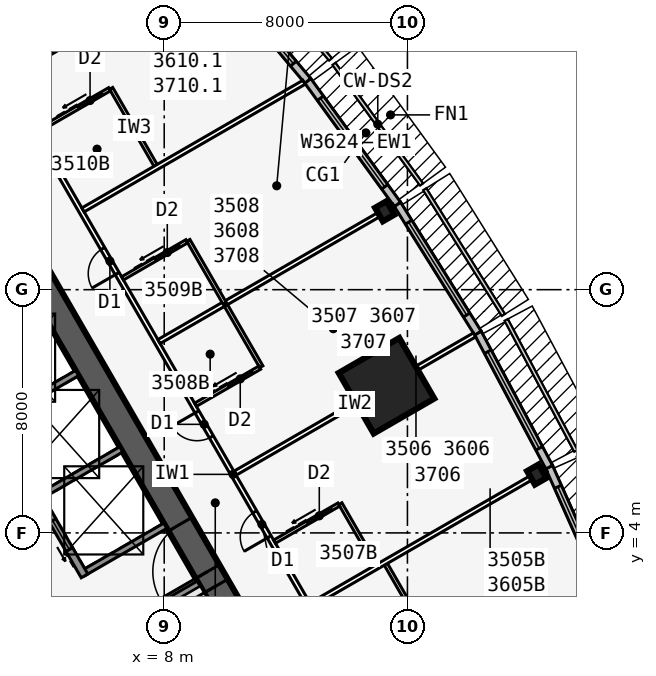
"""IFC4 building model, lengths in metres.
Left out: names, types, materials, properties, quantities, classifications, styles, units other than length and angle.
Written with IfcOpenShell. Run it as: python <this file> out.ifc"""

import sys

from ifc_helpers import new_model, si_unit, direction, frame, frame_2d, origin, origin_2d, place, context, subcontext, project, spatial, rectangle, i_section, extrude, element, fill, save


model = new_model("IFC4")
c1 = context("Model", 3, precision=1e-05, world=origin(), true_north=direction((0.0, 1.0)))
c2 = subcontext(c1, "Body", "Model", "MODEL_VIEW")
j1 = project(units=[si_unit("LENGTHUNIT", "METRE"), si_unit("PLANEANGLEUNIT", "RADIAN")], contexts=[c1])
p1 = place(None, origin())
s1 = spatial("IfcSite", under=j1, at=p1, CompositionType="ELEMENT")
p2 = place(p1, origin())
s2 = spatial("IfcBuilding", under=s1, at=p2, CompositionType="ELEMENT")
p3 = place(p2, frame((0.0, 0.0, 135.1)))
s3 = spatial("IfcBuildingStorey", under=s2, at=p3, CompositionType="ELEMENT", Elevation=135.1)
p4 = place(p3, frame((16.5, -9.526, 0.0), z_axis=(0.0, 0.0, 1.0), x_axis=(-0.499999749417, 0.866025548458, 0.0)))
e1 = element("IfcWall", 1, at=p4, inside=s3, PredefinedType="SHEAR", context=c2, shape_type="SweptSolid", body=[
    extrude(rectangle(XDim=33.0, YDim=0.9, at=frame_2d((16.5, 0.0))), origin(), (0.0, 0.0, 1.0), 3.4),
])
p5 = place(p4, frame((14.15, 0.0, 0.0)))
e2 = element("IfcOpeningElement", 2, at=p5, cuts=e1, PredefinedType="OPENING", context=c2, shape_type="SweptSolid", body=[
    extrude(rectangle(XDim=1.8, YDim=2.13, at=frame_2d((0.9, 1.065))), frame((0.0, 0.46, 0.0), z_axis=(0.0, -1.0, 0.0), x_axis=(1.0, 0.0, 0.0)), (0.0, 0.0, 1.0), 0.92),
])
p6 = place(p4, frame((12.6, 0.0, 0.0)))
e3 = element("IfcOpeningElement", 3, at=p6, cuts=e1, PredefinedType="OPENING", context=c2, shape_type="SweptSolid", body=[
    extrude(rectangle(XDim=1.0, YDim=2.13, at=frame_2d((0.5, 1.065))), frame((0.0, 0.46, 0.0), z_axis=(0.0, -1.0, 0.0), x_axis=(1.0, 0.0, 0.0)), (0.0, 0.0, 1.0), 0.92),
])
p7 = place(p3, frame((5.379, 2.586, 0.0), z_axis=(0.0, 0.0, 1.0), x_axis=(-0.500001375892, 0.866024609411, 0.0)))
e4 = element("IfcWall", 4, at=p7, inside=s3, PredefinedType="SOLIDWALL", context=c2, shape_type="SweptSolid", body=[
    extrude(rectangle(XDim=10.633, YDim=0.25, at=frame_2d((5.316, 0.0))), origin(), (0.0, 0.0, 1.0), 3.235),
])
p8 = place(p7, frame((9.164, 0.0, 0.0)))
e5 = element("IfcOpeningElement", 5, at=p8, cuts=e4, PredefinedType="OPENING", context=c2, shape_type="SweptSolid", body=[
    extrude(rectangle(XDim=0.9, YDim=2.13, at=frame_2d((0.45, 1.065))), frame((0.0, 0.135, 0.0), z_axis=(0.0, -1.0, 0.0), x_axis=(1.0, 0.0, 0.0)), (0.0, 0.0, 1.0), 0.27),
])
p9 = place(p7, frame((1.0, 0.0, 0.0)))
e6 = element("IfcOpeningElement", 6, at=p9, cuts=e4, PredefinedType="OPENING", context=c2, shape_type="SweptSolid", body=[
    extrude(rectangle(XDim=1.1, YDim=2.13, at=frame_2d((0.55, 1.065))), frame((0.0, 0.135, 0.0), z_axis=(0.0, -1.0, 0.0), x_axis=(1.0, 0.0, 0.0)), (0.0, 0.0, 1.0), 0.27),
])
p10 = place(p7, frame((3.9, 0.0, 0.0)))
e7 = element("IfcOpeningElement", 7, at=p10, cuts=e4, PredefinedType="OPENING", context=c2, shape_type="SweptSolid", body=[
    extrude(rectangle(XDim=1.1, YDim=2.13, at=frame_2d((0.55, 1.065))), frame((0.0, 0.135, 0.0), z_axis=(0.0, -1.0, 0.0), x_axis=(1.0, 0.0, 0.0)), (0.0, 0.0, 1.0), 0.27),
])
p11 = place(p7, frame((6.8, 0.0, 0.0)))
e8 = element("IfcOpeningElement", 8, at=p11, cuts=e4, PredefinedType="OPENING", context=c2, shape_type="SweptSolid", body=[
    extrude(rectangle(XDim=1.1, YDim=2.13, at=frame_2d((0.55, 1.065))), frame((0.0, 0.135, 0.0), z_axis=(0.0, -1.0, 0.0), x_axis=(1.0, 0.0, 0.0)), (0.0, 0.0, 1.0), 0.27),
])
for number, where, z_axis, x_axis in (
    (9, (6.429, 0.767, 0.0), (0.0, 0.0, 1.0), (0.866, 0.5, 0.0)),
    (10, (5.329, 2.673, 0.0), (0.0, 0.0, 1.0), (0.866, 0.5, 0.0)),
    (11, (3.879, 5.184, 0.0), (0.0, 0.0, 1.0), (0.866, 0.5, 0.0)),
    (12, (2.429, 7.696, 0.0), (0.0, 0.0, 1.0), (0.866, 0.5, 0.0)),
):
    element("IfcWall", number, at=place(p3, frame(where, z_axis=z_axis, x_axis=x_axis)), inside=s3, PredefinedType="SOLIDWALL", context=c2, shape_type="SweptSolid", body=[
        extrude(rectangle(XDim=3.125, YDim=0.2, at=frame_2d((1.562, 0.0))), origin(), (0.0, 0.0, 1.0), 3.235),
    ])
for number, where, z_axis, x_axis in (
    (13, (20.254, 5.92, 0.0), (0.0, 0.0, 1.0), (0.866, 0.5, 0.0)),
    (14, (15.254, 14.58, 0.0), (0.0, 0.0, 1.0), (0.866, 0.5, 0.0)),
):
    element("IfcColumn", number, at=place(p3, frame(where, z_axis=z_axis, x_axis=x_axis)), inside=s3, PredefinedType="COLUMN", context=c2, shape_type="SweptSolid", body=[
        extrude(i_section(OverallWidth=0.437, OverallDepth=0.513, WebThickness=0.061, FlangeThickness=0.097, at=origin_2d()), origin(), (0.0, 0.0, 1.0), 3.4),
    ])
p12 = place(p3, frame((15.312, 8.84, 0.0), z_axis=(0.0, 0.0, 1.0), x_axis=(0.866025403784, 0.5, 0.0)))
e15 = element("IfcColumn", 15, at=p12, inside=s3, PredefinedType="COLUMN", context=c2, shape_type="SweptSolid", body=[
    extrude(rectangle(XDim=2.3, YDim=2.3, at=origin_2d()), origin(), (0.0, 0.0, 1.0), 3.4),
])
p13 = place(p3, frame((22.705, 1.576, 0.0), z_axis=(0.0, 0.0, 1.0), x_axis=(-0.406832200364, 0.913502906808, 0.0)))
e16 = element("IfcWall", 16, at=p13, inside=s3, PredefinedType="STANDARD", context=c2, shape_type="SweptSolid", body=[
    extrude(rectangle(XDim=5.028, YDim=0.25, at=frame_2d((2.514, 0.0))), origin(), (0.0, 0.0, 1.0), 3.235),
])
p14 = place(p13, frame((0.714, 0.0, 0.45)))
e17 = element("IfcOpeningElement", 17, at=p14, cuts=e16, PredefinedType="OPENING", context=c2, shape_type="SweptSolid", body=[
    extrude(rectangle(XDim=3.6, YDim=2.4, at=frame_2d((1.8, 1.2))), frame((0.0, 0.135, 0.0), z_axis=(0.0, -1.0, 0.0), x_axis=(1.0, 0.0, 0.0)), (0.0, 0.0, 1.0), 0.27),
])
p15 = place(p3, frame((20.663, 6.161, 0.0), z_axis=(0.0, 0.0, 1.0), x_axis=(-0.469404966864, 0.882982999317, 0.0)))
e18 = element("IfcWall", 18, at=p15, inside=s3, PredefinedType="STANDARD", context=c2, shape_type="SweptSolid", body=[
    extrude(rectangle(XDim=5.003, YDim=0.25, at=frame_2d((2.501, 0.0))), origin(), (0.0, 0.0, 1.0), 3.235),
])
p16 = place(p15, frame((0.701, 0.0, 0.45)))
e19 = element("IfcOpeningElement", 19, at=p16, cuts=e18, PredefinedType="OPENING", context=c2, shape_type="SweptSolid", body=[
    extrude(rectangle(XDim=3.6, YDim=2.4, at=frame_2d((1.8, 1.2))), frame((0.0, 0.135, 0.0), z_axis=(0.0, -1.0, 0.0), x_axis=(1.0, 0.0, 0.0)), (0.0, 0.0, 1.0), 0.27),
])
p17 = place(p3, frame((18.319, 10.571, 0.0), z_axis=(0.0, 0.0, 1.0), x_axis=(-0.529990167382, 0.84800378683, 0.0)))
e20 = element("IfcWall", 20, at=p17, inside=s3, PredefinedType="STANDARD", context=c2, shape_type="SweptSolid", body=[
    extrude(rectangle(XDim=5.003, YDim=0.25, at=frame_2d((2.501, 0.0))), origin(), (0.0, 0.0, 1.0), 3.235),
])
p18 = place(p17, frame((0.701, 0.0, 0.45)))
e21 = element("IfcOpeningElement", 21, at=p18, cuts=e20, PredefinedType="OPENING", context=c2, shape_type="SweptSolid", body=[
    extrude(rectangle(XDim=3.6, YDim=2.4, at=frame_2d((1.8, 1.2))), frame((0.0, 0.135, 0.0), z_axis=(0.0, -1.0, 0.0), x_axis=(1.0, 0.0, 0.0)), (0.0, 0.0, 1.0), 0.27),
])
p19 = place(p3, frame((15.672, 14.807, 0.0), z_axis=(0.0, 0.0, 1.0), x_axis=(-0.587669188412, 0.809101307001, 0.0)))
e22 = element("IfcWall", 22, at=p19, inside=s3, PredefinedType="STANDARD", context=c2, shape_type="SweptSolid", body=[
    extrude(rectangle(XDim=5.028, YDim=0.25, at=frame_2d((2.514, 0.0))), origin(), (0.0, 0.0, 1.0), 3.235),
])
p20 = place(p19, frame((0.714, 0.0, 0.45)))
e23 = element("IfcOpeningElement", 23, at=p20, cuts=e22, PredefinedType="OPENING", context=c2, shape_type="SweptSolid", body=[
    extrude(rectangle(XDim=3.6, YDim=2.4, at=frame_2d((1.8, 1.2))), frame((0.0, 0.135, 0.0), z_axis=(0.0, -1.0, 0.0), x_axis=(1.0, 0.0, 0.0)), (0.0, 0.0, 1.0), 0.27),
])
p21 = place(p3, frame((12.723, 18.868, 0.0), z_axis=(0.0, 0.0, 1.0), x_axis=(-0.641810386606, 0.766863369607, 0.0)))
e24 = element("IfcWall", 24, at=p21, inside=s3, PredefinedType="STANDARD", context=c2, shape_type="SweptSolid", body=[
    extrude(rectangle(XDim=5.076, YDim=0.25, at=frame_2d((2.538, 0.0))), origin(), (0.0, 0.0, 1.0), 3.235),
])
p22 = place(p21, frame((0.738, 0.0, 0.45)))
e25 = element("IfcOpeningElement", 25, at=p22, cuts=e24, PredefinedType="OPENING", context=c2, shape_type="SweptSolid", body=[
    extrude(rectangle(XDim=3.6, YDim=2.4, at=frame_2d((1.8, 1.2))), frame((0.0, 0.135, 0.0), z_axis=(0.0, -1.0, 0.0), x_axis=(1.0, 0.0, 0.0)), (0.0, 0.0, 1.0), 0.27),
])
p23 = place(p3, frame((20.027, -10.985, 0.0), z_axis=(0.0, 0.0, 1.0), x_axis=(-0.500001677587, 0.866024435227, 0.0)))
e26 = element("IfcWall", 26, at=p23, inside=s3, PredefinedType="PARTITIONING", context=c2, shape_type="SweptSolid", body=[
    extrude(rectangle(XDim=39.054, YDim=0.15, at=frame_2d((19.527, 0.0))), origin(), (0.0, 0.0, 1.0), 3.235),
])
p24 = place(p23, frame((1.558, 0.0, 0.0)))
e27 = element("IfcOpeningElement", 27, at=p24, cuts=e26, PredefinedType="OPENING", context=c2, shape_type="SweptSolid", body=[
    extrude(rectangle(XDim=0.95, YDim=2.13, at=frame_2d((0.475, 1.065))), frame((0.0, 0.085, 0.0), z_axis=(0.0, -1.0, 0.0), x_axis=(1.0, 0.0, 0.0)), (0.0, 0.0, 1.0), 0.17),
])
p25 = place(p23, frame((10.352, 0.0, 0.0)))
e28 = element("IfcOpeningElement", 28, at=p25, cuts=e26, PredefinedType="OPENING", context=c2, shape_type="SweptSolid", body=[
    extrude(rectangle(XDim=0.95, YDim=2.13, at=frame_2d((0.475, 1.065))), frame((0.0, 0.085, 0.0), z_axis=(0.0, -1.0, 0.0), x_axis=(1.0, 0.0, 0.0)), (0.0, 0.0, 1.0), 0.17),
])
p26 = place(p23, frame((17.152, 0.0, 0.0)))
e29 = element("IfcOpeningElement", 29, at=p26, cuts=e26, PredefinedType="OPENING", context=c2, shape_type="SweptSolid", body=[
    extrude(rectangle(XDim=0.95, YDim=2.13, at=frame_2d((0.475, 1.065))), frame((0.0, 0.085, 0.0), z_axis=(0.0, -1.0, 0.0), x_axis=(1.0, 0.0, 0.0)), (0.0, 0.0, 1.0), 0.17),
])
p27 = place(p23, frame((20.952, 0.0, 0.0)))
e30 = element("IfcOpeningElement", 30, at=p27, cuts=e26, PredefinedType="OPENING", context=c2, shape_type="SweptSolid", body=[
    extrude(rectangle(XDim=0.95, YDim=2.13, at=frame_2d((0.475, 1.065))), frame((0.0, 0.085, 0.0), z_axis=(0.0, -1.0, 0.0), x_axis=(1.0, 0.0, 0.0)), (0.0, 0.0, 1.0), 0.17),
])
p28 = place(p23, frame((27.152, 0.0, 0.0)))
e31 = element("IfcOpeningElement", 31, at=p28, cuts=e26, PredefinedType="OPENING", context=c2, shape_type="SweptSolid", body=[
    extrude(rectangle(XDim=0.95, YDim=2.13, at=frame_2d((0.475, 1.065))), frame((0.0, 0.085, 0.0), z_axis=(0.0, -1.0, 0.0), x_axis=(1.0, 0.0, 0.0)), (0.0, 0.0, 1.0), 0.17),
])
p29 = place(p23, frame((36.546, 0.0, 0.0)))
e32 = element("IfcOpeningElement", 32, at=p29, cuts=e26, PredefinedType="OPENING", context=c2, shape_type="SweptSolid", body=[
    extrude(rectangle(XDim=0.95, YDim=2.13, at=frame_2d((0.475, 1.065))), frame((0.0, 0.085, 0.0), z_axis=(0.0, -1.0, 0.0), x_axis=(1.0, 0.0, 0.0)), (0.0, 0.0, 1.0), 0.17),
])
p30 = place(p3, frame((12.829, 1.633, 0.0), z_axis=(0.0, 0.0, 1.0), x_axis=(0.866027015393, 0.499997208602, 0.0)))
e33 = element("IfcWall", 33, at=p30, inside=s3, PredefinedType="PARTITIONING", context=c2, shape_type="SweptSolid", body=[
    extrude(rectangle(XDim=8.922, YDim=0.15, at=frame_2d((4.461, 0.0))), origin(), (0.0, 0.0, 1.0), 2.389),
])
p31 = place(p3, frame((10.329, 5.963, 0.0), z_axis=(0.0, 0.0, 1.0), x_axis=(0.866025170687, 0.500000403736, 0.0)))
e34 = element("IfcWall", 34, at=p31, inside=s3, PredefinedType="PARTITIONING", context=c2, shape_type="SweptSolid", body=[
    extrude(rectangle(XDim=9.099, YDim=0.15, at=frame_2d((4.549, 0.0))), origin(), (0.0, 0.0, 1.0), 2.389),
])
p32 = place(p3, frame((7.829, 10.293, 0.0), z_axis=(0.0, 0.0, 1.0), x_axis=(0.866027015393, 0.499997208602, 0.0)))
e35 = element("IfcWall", 35, at=p32, inside=s3, PredefinedType="PARTITIONING", context=c2, shape_type="SweptSolid", body=[
    extrude(rectangle(XDim=8.922, YDim=0.15, at=frame_2d((4.461, 0.0))), origin(), (0.0, 0.0, 1.0), 2.389),
])
p33 = place(p3, frame((5.329, 14.623, 0.0), z_axis=(0.0, 0.0, 1.0), x_axis=(0.866011723728, 0.500023693804, 0.0)))
e36 = element("IfcWall", 36, at=p33, inside=s3, PredefinedType="PARTITIONING", context=c2, shape_type="SweptSolid", body=[
    extrude(rectangle(XDim=8.395, YDim=0.15, at=frame_2d((4.198, 0.0))), origin(), (0.0, 0.0, 1.0), 2.389),
])
p34 = place(p3, frame((2.829, 18.954, 0.0), z_axis=(0.0, 0.0, 1.0), x_axis=(0.866015739374, 0.500016738876, 0.0)))
e37 = element("IfcWall", 37, at=p34, inside=s3, PredefinedType="PARTITIONING", context=c2, shape_type="SweptSolid", body=[
    extrude(rectangle(XDim=7.516, YDim=0.1, at=frame_2d((3.758, 0.0))), origin(), (0.0, 0.0, 1.0), 2.389),
])
p35 = place(p34, frame((0.45, 0.0, 0.0)))
e38 = element("IfcOpeningElement", 38, at=p35, cuts=e37, PredefinedType="OPENING", context=c2, shape_type="SweptSolid", body=[
    extrude(rectangle(XDim=0.9, YDim=2.13, at=frame_2d((0.45, 1.065))), frame((0.0, 0.06, 0.0), z_axis=(0.0, -1.0, 0.0), x_axis=(1.0, 0.0, 0.0)), (0.0, 0.0, 1.0), 0.12),
])
p36 = place(p3, frame((16.753, 0.435, 0.0), z_axis=(0.0, 0.0, 1.0), x_axis=(-0.499990139034, 0.866031096941, 0.0)))
e39 = element("IfcWall", 39, at=p36, inside=s3, PredefinedType="PLUMBINGWALL", context=c2, shape_type="SweptSolid", body=[
    extrude(rectangle(XDim=3.0, YDim=0.12, at=frame_2d((1.5, 0.0))), origin(), (0.0, 0.0, 1.0), 3.235),
])
p37 = place(p3, frame((14.993, 2.883, 0.0), z_axis=(0.0, 0.0, 1.0), x_axis=(-0.500001309137, 0.866024647952, 0.0)))
e40 = element("IfcWall", 40, at=p37, inside=s3, PredefinedType="PLUMBINGWALL", context=c2, shape_type="SweptSolid", body=[
    extrude(rectangle(XDim=2.4, YDim=0.12, at=frame_2d((1.2, 0.0))), origin(), (0.0, 0.0, 1.0), 3.235),
])
p38 = place(p3, frame((11.628, 3.711, 0.0), z_axis=(0.0, 0.0, 1.0), x_axis=(0.866048967903, 0.499959183527, 0.0)))
e41 = element("IfcWall", 41, at=p38, inside=s3, PredefinedType="PLUMBINGWALL", context=c2, shape_type="SweptSolid", body=[
    extrude(rectangle(XDim=2.44, YDim=0.12, at=frame_2d((1.22, 0.0))), origin(), (0.0, 0.0, 1.0), 3.235),
])
p39 = place(p38, frame((1.25, 0.0, 0.0)))
e42 = element("IfcOpeningElement", 42, at=p39, cuts=e41, PredefinedType="OPENING", context=c2, shape_type="SweptSolid", body=[
    extrude(rectangle(XDim=0.9, YDim=2.13, at=frame_2d((0.45, 1.065))), frame((0.0, 0.07, 0.0), z_axis=(0.0, -1.0, 0.0), x_axis=(1.0, 0.0, 0.0)), (0.0, 0.0, 1.0), 0.14),
])
p40 = place(p3, frame((11.194, 9.465, 0.0), z_axis=(0.0, 0.0, 1.0), x_axis=(-0.500077600433, 0.865980596518, 0.0)))
e43 = element("IfcWall", 43, at=p40, inside=s3, PredefinedType="PLUMBINGWALL", context=c2, shape_type="SweptSolid", body=[
    extrude(rectangle(XDim=2.4, YDim=0.12, at=frame_2d((1.2, 0.0))), origin(), (0.0, 0.0, 1.0), 3.235),
])
p41 = place(p3, frame((9.029, 8.215, 0.0), z_axis=(0.0, 0.0, 1.0), x_axis=(0.866023955769, 0.500002508028, 0.0)))
e44 = element("IfcWall", 44, at=p41, inside=s3, PredefinedType="PLUMBINGWALL", context=c2, shape_type="SweptSolid", body=[
    extrude(rectangle(XDim=2.44, YDim=0.12, at=frame_2d((1.22, 0.0))), origin(), (0.0, 0.0, 1.0), 3.235),
])
p42 = place(p41, frame((1.25, 0.0, 0.0)))
e45 = element("IfcOpeningElement", 45, at=p42, cuts=e44, PredefinedType="OPENING", context=c2, shape_type="SweptSolid", body=[
    extrude(rectangle(XDim=0.9, YDim=2.13, at=frame_2d((0.45, 1.065))), frame((0.0, 0.07, 0.0), z_axis=(0.0, -1.0, 0.0), x_axis=(1.0, 0.0, 0.0)), (0.0, 0.0, 1.0), 0.14),
])
p43 = place(p3, frame((9.993, 11.543, 0.0), z_axis=(0.0, 0.0, 1.0), x_axis=(-0.500001309137, 0.866024647952, 0.0)))
e46 = element("IfcWall", 46, at=p43, inside=s3, PredefinedType="PLUMBINGWALL", context=c2, shape_type="SweptSolid", body=[
    extrude(rectangle(XDim=2.4, YDim=0.12, at=frame_2d((1.2, 0.0))), origin(), (0.0, 0.0, 1.0), 3.235),
])
p44 = place(p3, frame((6.628, 12.372, 0.0), z_axis=(0.0, 0.0, 1.0), x_axis=(0.866005645448, 0.500034220881, 0.0)))
e47 = element("IfcWall", 47, at=p44, inside=s3, PredefinedType="PLUMBINGWALL", context=c2, shape_type="SweptSolid", body=[
    extrude(rectangle(XDim=2.44, YDim=0.12, at=frame_2d((1.22, 0.0))), origin(), (0.0, 0.0, 1.0), 3.235),
])
p45 = place(p44, frame((1.25, 0.0, 0.0)))
e48 = element("IfcOpeningElement", 48, at=p45, cuts=e47, PredefinedType="OPENING", context=c2, shape_type="SweptSolid", body=[
    extrude(rectangle(XDim=0.9, YDim=2.13, at=frame_2d((0.45, 1.065))), frame((0.0, 0.07, 0.0), z_axis=(0.0, -1.0, 0.0), x_axis=(1.0, 0.0, 0.0)), (0.0, 0.0, 1.0), 0.14),
])
p46 = place(p3, frame((7.753, 16.023, 0.0), z_axis=(0.0, 0.0, 1.0), x_axis=(-0.499990139034, 0.866031096941, 0.0)))
e49 = element("IfcWall", 49, at=p46, inside=s3, PredefinedType="PLUMBINGWALL", context=c2, shape_type="SweptSolid", body=[
    extrude(rectangle(XDim=3.0, YDim=0.12, at=frame_2d((1.5, 0.0))), origin(), (0.0, 0.0, 1.0), 3.235),
])
p47 = place(p3, frame((3.829, 17.221, 0.0), z_axis=(0.0, 0.0, 1.0), x_axis=(0.865997131366, 0.500048966069, 0.0)))
e50 = element("IfcWall", 50, at=p47, inside=s3, PredefinedType="PLUMBINGWALL", context=c2, shape_type="SweptSolid", body=[
    extrude(rectangle(XDim=2.74, YDim=0.12, at=frame_2d((1.37, 0.0))), origin(), (0.0, 0.0, 1.0), 3.235),
])
p48 = place(p47, frame((1.55, 0.0, 0.0)))
e51 = element("IfcOpeningElement", 51, at=p48, cuts=e50, PredefinedType="OPENING", context=c2, shape_type="SweptSolid", body=[
    extrude(rectangle(XDim=0.9, YDim=2.13, at=frame_2d((0.45, 1.065))), frame((0.0, 0.07, 0.0), z_axis=(0.0, -1.0, 0.0), x_axis=(1.0, 0.0, 0.0)), (0.0, 0.0, 1.0), 0.14),
])
p49 = place(p14, origin())
e52 = element("IfcWindow", 52, at=p49, inside=s3, PartitioningType="SINGLE_PANEL", PredefinedType="WINDOW", context=c2, shape_type="SweptSolid", body=[
    extrude(rectangle(XDim=3.6, YDim=2.4, at=frame_2d((1.8, 1.2))), frame((0.0, 0.03, 0.0), z_axis=(0.0, -1.0, 0.0), x_axis=(1.0, 0.0, 0.0)), (0.0, 0.0, 1.0), 0.06),
])
fill(e17, e52)
p50 = place(p16, origin())
e53 = element("IfcWindow", 53, at=p50, inside=s3, PartitioningType="SINGLE_PANEL", PredefinedType="WINDOW", context=c2, shape_type="SweptSolid", body=[
    extrude(rectangle(XDim=3.6, YDim=2.4, at=frame_2d((1.8, 1.2))), frame((0.0, 0.03, 0.0), z_axis=(0.0, -1.0, 0.0), x_axis=(1.0, 0.0, 0.0)), (0.0, 0.0, 1.0), 0.06),
])
fill(e19, e53)
p51 = place(p18, origin())
e54 = element("IfcWindow", 54, at=p51, inside=s3, PartitioningType="SINGLE_PANEL", PredefinedType="WINDOW", context=c2, shape_type="SweptSolid", body=[
    extrude(rectangle(XDim=3.6, YDim=2.4, at=frame_2d((1.8, 1.2))), frame((0.0, 0.03, 0.0), z_axis=(0.0, -1.0, 0.0), x_axis=(1.0, 0.0, 0.0)), (0.0, 0.0, 1.0), 0.06),
])
fill(e21, e54)
p52 = place(p20, origin())
e55 = element("IfcWindow", 55, at=p52, inside=s3, PartitioningType="SINGLE_PANEL", PredefinedType="WINDOW", context=c2, shape_type="SweptSolid", body=[
    extrude(rectangle(XDim=3.6, YDim=2.4, at=frame_2d((1.8, 1.2))), frame((0.0, 0.03, 0.0), z_axis=(0.0, -1.0, 0.0), x_axis=(1.0, 0.0, 0.0)), (0.0, 0.0, 1.0), 0.06),
])
fill(e23, e55)
p53 = place(p22, origin())
e56 = element("IfcWindow", 56, at=p53, inside=s3, PartitioningType="SINGLE_PANEL", PredefinedType="WINDOW", context=c2, shape_type="SweptSolid", body=[
    extrude(rectangle(XDim=3.6, YDim=2.4, at=frame_2d((1.8, 1.2))), frame((0.0, 0.03, 0.0), z_axis=(0.0, -1.0, 0.0), x_axis=(1.0, 0.0, 0.0)), (0.0, 0.0, 1.0), 0.06),
])
fill(e25, e56)
p54 = place(p39, origin())
e57 = element("IfcDoor", 57, at=p54, inside=s3, OperationType="SLIDING_TO_LEFT", PredefinedType="DOOR", context=c2, shape_type="SweptSolid", body=[
    extrude(rectangle(XDim=0.9, YDim=2.13, at=frame_2d((0.45, 1.065))), frame((0.0, 0.025, 0.0), z_axis=(0.0, -1.0, 0.0), x_axis=(1.0, 0.0, 0.0)), (0.0, 0.0, 1.0), 0.05),
])
fill(e42, e57)
p55 = place(p26, origin())
e58 = element("IfcDoor", 58, at=p55, inside=s3, OperationType="SINGLE_SWING_LEFT", PredefinedType="DOOR", context=c2, shape_type="SweptSolid", body=[
    extrude(rectangle(XDim=0.95, YDim=2.13, at=frame_2d((0.475, 1.065))), frame((0.0, 0.025, 0.0), z_axis=(0.0, -1.0, 0.0), x_axis=(1.0, 0.0, 0.0)), (0.0, 0.0, 1.0), 0.05),
])
fill(e29, e58)
p56 = place(p42, origin())
e59 = element("IfcDoor", 59, at=p56, inside=s3, OperationType="SLIDING_TO_LEFT", PredefinedType="DOOR", context=c2, shape_type="SweptSolid", body=[
    extrude(rectangle(XDim=0.9, YDim=2.13, at=frame_2d((0.45, 1.065))), frame((0.0, 0.025, 0.0), z_axis=(0.0, -1.0, 0.0), x_axis=(1.0, 0.0, 0.0)), (0.0, 0.0, 1.0), 0.05),
])
fill(e45, e59)
p57 = place(p27, origin())
e60 = element("IfcDoor", 60, at=p57, inside=s3, OperationType="SINGLE_SWING_RIGHT", PredefinedType="DOOR", context=c2, shape_type="SweptSolid", body=[
    extrude(rectangle(XDim=0.95, YDim=2.13, at=frame_2d((0.475, 1.065))), frame((0.0, 0.025, 0.0), z_axis=(0.0, -1.0, 0.0), x_axis=(1.0, 0.0, 0.0)), (0.0, 0.0, 1.0), 0.05),
])
fill(e30, e60)
p58 = place(p45, origin())
e61 = element("IfcDoor", 61, at=p58, inside=s3, OperationType="SLIDING_TO_LEFT", PredefinedType="DOOR", context=c2, shape_type="SweptSolid", body=[
    extrude(rectangle(XDim=0.9, YDim=2.13, at=frame_2d((0.45, 1.065))), frame((0.0, 0.025, 0.0), z_axis=(0.0, -1.0, 0.0), x_axis=(1.0, 0.0, 0.0)), (0.0, 0.0, 1.0), 0.05),
])
fill(e48, e61)
p59 = place(p28, origin())
e62 = element("IfcDoor", 62, at=p59, inside=s3, OperationType="SINGLE_SWING_LEFT", PredefinedType="DOOR", context=c2, shape_type="SweptSolid", body=[
    extrude(rectangle(XDim=0.95, YDim=2.13, at=frame_2d((0.475, 1.065))), frame((0.0, 0.025, 0.0), z_axis=(0.0, -1.0, 0.0), x_axis=(1.0, 0.0, 0.0)), (0.0, 0.0, 1.0), 0.05),
])
fill(e31, e62)
p60 = place(p48, origin())
e63 = element("IfcDoor", 63, at=p60, inside=s3, OperationType="SLIDING_TO_LEFT", PredefinedType="DOOR", context=c2, shape_type="SweptSolid", body=[
    extrude(rectangle(XDim=0.9, YDim=2.13, at=frame_2d((0.45, 1.065))), frame((0.0, 0.025, 0.0), z_axis=(0.0, -1.0, 0.0), x_axis=(1.0, 0.0, 0.0)), (0.0, 0.0, 1.0), 0.05),
])
fill(e51, e63)
p61 = place(p5, origin())
e64 = element("IfcDoor", 64, at=p61, inside=s3, OperationType="DOUBLE_DOOR_SINGLE_SWING", PredefinedType="DOOR", context=c2, shape_type="SweptSolid", body=[
    extrude(rectangle(XDim=1.8, YDim=2.13, at=frame_2d((0.9, 1.065))), frame((0.0, 0.025, 0.0), z_axis=(0.0, -1.0, 0.0), x_axis=(1.0, 0.0, 0.0)), (0.0, 0.0, 1.0), 0.05),
])
fill(e2, e64)
p62 = place(p6, origin())
e65 = element("IfcDoor", 65, at=p62, inside=s3, OperationType="SINGLE_SWING_RIGHT", PredefinedType="DOOR", context=c2, shape_type="SweptSolid", body=[
    extrude(rectangle(XDim=1.0, YDim=2.13, at=frame_2d((0.5, 1.065))), frame((0.0, 0.025, 0.0), z_axis=(0.0, -1.0, 0.0), x_axis=(1.0, 0.0, 0.0)), (0.0, 0.0, 1.0), 0.05),
])
fill(e3, e65)
p63 = place(p9, origin())
e66 = element("IfcDoor", 66, at=p63, inside=s3, OperationType="DOUBLE_DOOR_SLIDING", PredefinedType="USERDEFINED", context=c2, shape_type="SweptSolid", body=[
    extrude(rectangle(XDim=1.1, YDim=2.13, at=frame_2d((0.55, 1.065))), frame((0.0, 0.025, 0.0), z_axis=(0.0, -1.0, 0.0), x_axis=(1.0, 0.0, 0.0)), (0.0, 0.0, 1.0), 0.05),
])
fill(e6, e66)
save(model, sys.argv[1])
